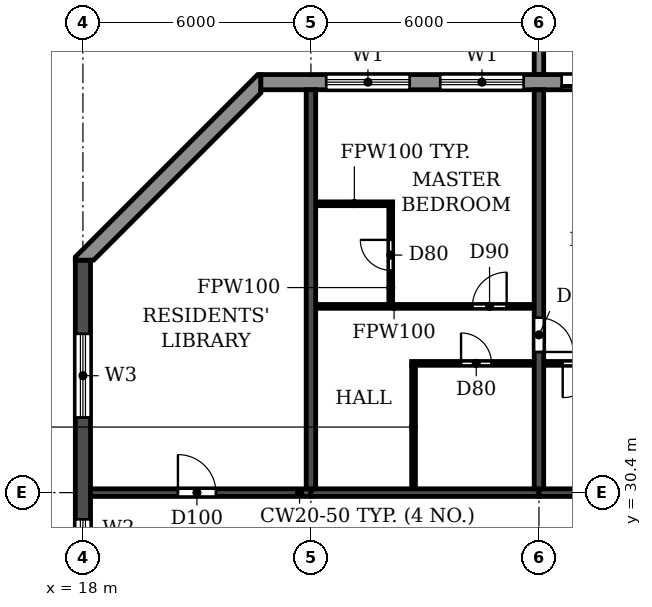
"""IFC4 building model, lengths in metres.
Left out: names, types, materials, properties, quantities, classifications, styles, units other than length and angle.
Written with IfcOpenShell. Run it as: python <this file> out.ifc"""

import sys

from ifc_helpers import new_model, si_unit, direction, frame, frame_2d, origin, place, context, subcontext, project, spatial, polyline, rectangle, outline, extrude, source, transform, mapped, element, fill, save


model = new_model("IFC4")
c1 = context("Model", 3, precision=1e-05, world=origin(), true_north=direction((0.0, 1.0)))
c2 = subcontext(c1, "Body", "Model", "MODEL_VIEW")
j1 = project(units=[si_unit("LENGTHUNIT", "METRE"), si_unit("PLANEANGLEUNIT", "RADIAN")], contexts=[c1])
p1 = place(None, origin())
s1 = spatial("IfcSite", under=j1, at=p1, CompositionType="ELEMENT")
p2 = place(p1, origin())
s2 = spatial("IfcBuilding", under=s1, at=p2, CompositionType="ELEMENT")
p3 = place(p2, frame((0.0, 0.0, 221.4)))
s3 = spatial("IfcBuildingStorey", under=s2, at=p3, CompositionType="ELEMENT", Elevation=221.4)
p4 = place(p3, frame((24.0, 30.5, 0.0), z_axis=(0.0, 0.0, 1.0), x_axis=(0.0, 1.0, 0.0)))
e1 = element("IfcWall", 1, at=p4, inside=s3, PredefinedType="SHEAR", context=c2, shape_type="SweptSolid", body=[
    extrude(rectangle(XDim=10.5, YDim=0.25, at=frame_2d((5.25, 0.0))), origin(), (0.0, 0.0, 1.0), 3.08),
])
p5 = place(p3, frame((30.0, 30.5, 0.0), z_axis=(0.0, 0.0, 1.0), x_axis=(0.0, 1.0, 0.0)))
e2 = element("IfcWall", 2, at=p5, inside=s3, PredefinedType="SHEAR", context=c2, shape_type="SweptSolid", body=[
    extrude(rectangle(XDim=10.5, YDim=0.25, at=frame_2d((5.25, 0.0))), origin(), (0.0, 0.0, 1.0), 3.08),
])
p6 = place(p5, frame((3.6, 0.0, 0.0)))
e3 = element("IfcOpeningElement", 3, at=p6, cuts=e2, PredefinedType="OPENING", context=c2, shape_type="SweptSolid", body=[
    extrude(rectangle(XDim=0.9, YDim=2.1, at=frame_2d((0.45, 1.05))), frame((0.0, 0.135, 0.0), z_axis=(0.0, -1.0, 0.0), x_axis=(1.0, 0.0, 0.0)), (0.0, 0.0, 1.0), 0.27),
])
p7 = place(p3, frame((18.0, 4.683, 0.0), z_axis=(0.0, 0.0, 1.0), x_axis=(0.0, 1.0, 0.0)))
e4 = element("IfcWall", 4, at=p7, inside=s3, PredefinedType="SHEAR", context=c2, shape_type="SweptSolid", body=[
    extrude(rectangle(XDim=31.834, YDim=0.4, at=frame_2d((15.917, 0.0))), origin(), (0.0, 0.0, 1.0), 3.08),
])
p8 = place(p7, frame((23.817, 0.0, 0.9)))
e5 = element("IfcOpeningElement", 5, at=p8, cuts=e4, PredefinedType="OPENING", context=c2, shape_type="SweptSolid", body=[
    extrude(rectangle(XDim=1.2, YDim=1.5, at=frame_2d((0.6, 0.75))), frame((0.0, 0.21, 0.0), z_axis=(0.0, -1.0, 0.0), x_axis=(1.0, 0.0, 0.0)), (0.0, 0.0, 1.0), 0.42),
])
p9 = place(p7, frame((8.017, 0.0, 0.9)))
e6 = element("IfcOpeningElement", 6, at=p9, cuts=e4, PredefinedType="OPENING", context=c2, shape_type="SweptSolid", body=[
    extrude(rectangle(XDim=1.2, YDim=1.5, at=frame_2d((0.6, 0.75))), frame((0.0, 0.21, 0.0), z_axis=(0.0, -1.0, 0.0), x_axis=(1.0, 0.0, 0.0)), (0.0, 0.0, 1.0), 0.42),
])
p10 = place(p7, frame((27.694, 0.0, 0.6)))
e7 = element("IfcOpeningElement", 7, at=p10, cuts=e4, PredefinedType="OPENING", context=c2, shape_type="SweptSolid", body=[
    extrude(rectangle(XDim=2.2, YDim=1.8, at=frame_2d((1.1, 0.9))), frame((0.0, 0.21, 0.0), z_axis=(0.0, -1.0, 0.0), x_axis=(1.0, 0.0, 0.0)), (0.0, 0.0, 1.0), 0.42),
])
p11 = place(p7, frame((2.541, 0.0, 0.6)))
e8 = element("IfcOpeningElement", 8, at=p11, cuts=e4, PredefinedType="OPENING", context=c2, shape_type="SweptSolid", body=[
    extrude(rectangle(XDim=2.2, YDim=1.8, at=frame_2d((1.1, 0.9))), frame((0.0, 0.21, 0.0), z_axis=(0.0, -1.0, 0.0), x_axis=(1.0, 0.0, 0.0)), (0.0, 0.0, 1.0), 0.42),
])
p12 = place(p7, frame((15.917, 0.0, 0.9)))
e9 = element("IfcOpeningElement", 9, at=p12, cuts=e4, PredefinedType="OPENING", context=c2, shape_type="SweptSolid", body=[
    extrude(rectangle(XDim=1.2, YDim=1.5, at=frame_2d((0.6, 0.75))), frame((0.0, 0.21, 0.0), z_axis=(0.0, -1.0, 0.0), x_axis=(1.0, 0.0, 0.0)), (0.0, 0.0, 1.0), 0.42),
])
p13 = place(p3, frame((18.2, 30.4, 0.0), z_axis=(0.0, 0.0, 1.0), x_axis=(1.0, 0.0, 0.0)))
e10 = element("IfcWall", 10, at=p13, inside=s3, PredefinedType="SHEAR", context=c2, shape_type="SweptSolid", body=[
    extrude(rectangle(XDim=5.8, YDim=0.2, at=frame_2d((2.9, 0.0))), origin(), (0.0, 0.0, 1.0), 2.48),
])
p14 = place(p13, frame((2.3, 0.0, 0.0)))
e11 = element("IfcOpeningElement", 11, at=p14, cuts=e10, PredefinedType="OPENING", context=c2, shape_type="SweptSolid", body=[
    extrude(rectangle(XDim=1.0, YDim=2.1, at=frame_2d((0.5, 1.05))), frame((0.0, 0.11, 0.0), z_axis=(0.0, -1.0, 0.0), x_axis=(1.0, 0.0, 0.0)), (0.0, 0.0, 1.0), 0.22),
])
p15 = place(p3, frame((24.0, 30.4, 0.0), z_axis=(0.0, 0.0, 1.0), x_axis=(1.0, 0.0, 0.0)))
e12 = element("IfcWall", 12, at=p15, inside=s3, PredefinedType="SHEAR", context=c2, shape_type="SweptSolid", body=[
    extrude(rectangle(XDim=6.0, YDim=0.2, at=frame_2d((3.0, 0.0))), origin(), (0.0, 0.0, 1.0), 2.48),
])
p16 = place(p3, frame((30.0, 30.4, 0.0), z_axis=(0.0, 0.0, 1.0), x_axis=(1.0, 0.0, 0.0)))
e13 = element("IfcWall", 13, at=p16, inside=s3, PredefinedType="SHEAR", context=c2, shape_type="SweptSolid", body=[
    extrude(rectangle(XDim=6.0, YDim=0.2, at=frame_2d((3.0, 0.0))), origin(), (0.0, 0.0, 1.0), 2.48),
])
p17 = place(p16, frame((2.55, 0.0, 0.0)))
e14 = element("IfcOpeningElement", 14, at=p17, cuts=e13, PredefinedType="OPENING", context=c2, shape_type="SweptSolid", body=[
    extrude(rectangle(XDim=1.0, YDim=2.1, at=frame_2d((0.5, 1.05))), frame((0.0, 0.11, 0.0), z_axis=(0.0, -1.0, 0.0), x_axis=(1.0, 0.0, 0.0)), (0.0, 0.0, 1.0), 0.22),
])
p18 = place(p3, frame((79.317, 41.2, 0.0), z_axis=(0.0, 0.0, 1.0), x_axis=(-1.0, 0.0, 0.0)))
e15 = element("IfcWall", 15, at=p18, inside=s3, PredefinedType="STANDARD", context=c2, shape_type="SweptSolid", body=[
    extrude(rectangle(XDim=56.634, YDim=0.4, at=frame_2d((28.317, 0.0))), origin(), (0.0, 0.0, 1.0), 3.08),
])
p19 = place(p18, frame((52.717, 0.0, 0.9)))
e16 = element("IfcOpeningElement", 16, at=p19, cuts=e15, PredefinedType="OPENING", context=c2, shape_type="SweptSolid", body=[
    extrude(rectangle(XDim=2.2, YDim=1.5, at=frame_2d((1.1, 0.75))), frame((0.0, 0.21, 0.0), z_axis=(0.0, -1.0, 0.0), x_axis=(1.0, 0.0, 0.0)), (0.0, 0.0, 1.0), 0.42),
])
p20 = place(p18, frame((49.717, 0.0, 0.9)))
e17 = element("IfcOpeningElement", 17, at=p20, cuts=e15, PredefinedType="OPENING", context=c2, shape_type="SweptSolid", body=[
    extrude(rectangle(XDim=2.2, YDim=1.5, at=frame_2d((1.1, 0.75))), frame((0.0, 0.21, 0.0), z_axis=(0.0, -1.0, 0.0), x_axis=(1.0, 0.0, 0.0)), (0.0, 0.0, 1.0), 0.42),
])
p21 = place(p18, frame((46.917, 0.0, 0.0)))
e18 = element("IfcOpeningElement", 18, at=p21, cuts=e15, PredefinedType="OPENING", context=c2, shape_type="SweptSolid", body=[
    extrude(rectangle(XDim=1.8, YDim=2.4, at=frame_2d((0.9, 1.2))), frame((0.0, 0.21, 0.0), z_axis=(0.0, -1.0, 0.0), x_axis=(1.0, 0.0, 0.0)), (0.0, 0.0, 1.0), 0.42),
])
p22 = place(p18, frame((43.717, 0.0, 0.9)))
e19 = element("IfcOpeningElement", 19, at=p22, cuts=e15, PredefinedType="OPENING", context=c2, shape_type="SweptSolid", body=[
    extrude(rectangle(XDim=2.2, YDim=1.5, at=frame_2d((1.1, 0.75))), frame((0.0, 0.21, 0.0), z_axis=(0.0, -1.0, 0.0), x_axis=(1.0, 0.0, 0.0)), (0.0, 0.0, 1.0), 0.42),
])
p23 = place(p18, frame((40.717, 0.0, 0.9)))
e20 = element("IfcOpeningElement", 20, at=p23, cuts=e15, PredefinedType="OPENING", context=c2, shape_type="SweptSolid", body=[
    extrude(rectangle(XDim=2.2, YDim=1.5, at=frame_2d((1.1, 0.75))), frame((0.0, 0.21, 0.0), z_axis=(0.0, -1.0, 0.0), x_axis=(1.0, 0.0, 0.0)), (0.0, 0.0, 1.0), 0.42),
])
p24 = place(p18, frame((37.917, 0.0, 0.0)))
e21 = element("IfcOpeningElement", 21, at=p24, cuts=e15, PredefinedType="OPENING", context=c2, shape_type="SweptSolid", body=[
    extrude(rectangle(XDim=1.8, YDim=2.4, at=frame_2d((0.9, 1.2))), frame((0.0, 0.21, 0.0), z_axis=(0.0, -1.0, 0.0), x_axis=(1.0, 0.0, 0.0)), (0.0, 0.0, 1.0), 0.42),
])
p25 = place(p18, frame((34.717, 0.0, 0.9)))
e22 = element("IfcOpeningElement", 22, at=p25, cuts=e15, PredefinedType="OPENING", context=c2, shape_type="SweptSolid", body=[
    extrude(rectangle(XDim=2.2, YDim=1.5, at=frame_2d((1.1, 0.75))), frame((0.0, 0.21, 0.0), z_axis=(0.0, -1.0, 0.0), x_axis=(1.0, 0.0, 0.0)), (0.0, 0.0, 1.0), 0.42),
])
p26 = place(p18, frame((31.717, 0.0, 0.9)))
e23 = element("IfcOpeningElement", 23, at=p26, cuts=e15, PredefinedType="OPENING", context=c2, shape_type="SweptSolid", body=[
    extrude(rectangle(XDim=2.2, YDim=1.5, at=frame_2d((1.1, 0.75))), frame((0.0, 0.21, 0.0), z_axis=(0.0, -1.0, 0.0), x_axis=(1.0, 0.0, 0.0)), (0.0, 0.0, 1.0), 0.42),
])
p27 = place(p18, frame((28.717, 0.0, 0.9)))
e24 = element("IfcOpeningElement", 24, at=p27, cuts=e15, PredefinedType="OPENING", context=c2, shape_type="SweptSolid", body=[
    extrude(rectangle(XDim=2.2, YDim=1.5, at=frame_2d((1.1, 0.75))), frame((0.0, 0.21, 0.0), z_axis=(0.0, -1.0, 0.0), x_axis=(1.0, 0.0, 0.0)), (0.0, 0.0, 1.0), 0.42),
])
p28 = place(p18, frame((25.917, 0.0, 0.0)))
e25 = element("IfcOpeningElement", 25, at=p28, cuts=e15, PredefinedType="OPENING", context=c2, shape_type="SweptSolid", body=[
    extrude(rectangle(XDim=1.8, YDim=2.4, at=frame_2d((0.9, 1.2))), frame((0.0, 0.21, 0.0), z_axis=(0.0, -1.0, 0.0), x_axis=(1.0, 0.0, 0.0)), (0.0, 0.0, 1.0), 0.42),
])
p29 = place(p18, frame((22.717, 0.0, 0.9)))
e26 = element("IfcOpeningElement", 26, at=p29, cuts=e15, PredefinedType="OPENING", context=c2, shape_type="SweptSolid", body=[
    extrude(rectangle(XDim=2.2, YDim=1.5, at=frame_2d((1.1, 0.75))), frame((0.0, 0.21, 0.0), z_axis=(0.0, -1.0, 0.0), x_axis=(1.0, 0.0, 0.0)), (0.0, 0.0, 1.0), 0.42),
])
p30 = place(p18, frame((19.717, 0.0, 0.9)))
e27 = element("IfcOpeningElement", 27, at=p30, cuts=e15, PredefinedType="OPENING", context=c2, shape_type="SweptSolid", body=[
    extrude(rectangle(XDim=2.2, YDim=1.5, at=frame_2d((1.1, 0.75))), frame((0.0, 0.21, 0.0), z_axis=(0.0, -1.0, 0.0), x_axis=(1.0, 0.0, 0.0)), (0.0, 0.0, 1.0), 0.42),
])
p31 = place(p18, frame((16.717, 0.0, 0.9)))
e28 = element("IfcOpeningElement", 28, at=p31, cuts=e15, PredefinedType="OPENING", context=c2, shape_type="SweptSolid", body=[
    extrude(rectangle(XDim=2.2, YDim=1.5, at=frame_2d((1.1, 0.75))), frame((0.0, 0.21, 0.0), z_axis=(0.0, -1.0, 0.0), x_axis=(1.0, 0.0, 0.0)), (0.0, 0.0, 1.0), 0.42),
])
p32 = place(p18, frame((13.917, 0.0, 0.0)))
e29 = element("IfcOpeningElement", 29, at=p32, cuts=e15, PredefinedType="OPENING", context=c2, shape_type="SweptSolid", body=[
    extrude(rectangle(XDim=1.8, YDim=2.4, at=frame_2d((0.9, 1.2))), frame((0.0, 0.21, 0.0), z_axis=(0.0, -1.0, 0.0), x_axis=(1.0, 0.0, 0.0)), (0.0, 0.0, 1.0), 0.42),
])
p33 = place(p18, frame((10.717, 0.0, 0.9)))
e30 = element("IfcOpeningElement", 30, at=p33, cuts=e15, PredefinedType="OPENING", context=c2, shape_type="SweptSolid", body=[
    extrude(rectangle(XDim=2.2, YDim=1.5, at=frame_2d((1.1, 0.75))), frame((0.0, 0.21, 0.0), z_axis=(0.0, -1.0, 0.0), x_axis=(1.0, 0.0, 0.0)), (0.0, 0.0, 1.0), 0.42),
])
p34 = place(p18, frame((7.917, 0.0, 0.0)))
e31 = element("IfcOpeningElement", 31, at=p34, cuts=e15, PredefinedType="OPENING", context=c2, shape_type="SweptSolid", body=[
    extrude(rectangle(XDim=1.8, YDim=2.4, at=frame_2d((0.9, 1.2))), frame((0.0, 0.21, 0.0), z_axis=(0.0, -1.0, 0.0), x_axis=(1.0, 0.0, 0.0)), (0.0, 0.0, 1.0), 0.42),
])
p35 = place(p18, frame((4.717, 0.0, 0.9)))
e32 = element("IfcOpeningElement", 32, at=p35, cuts=e15, PredefinedType="OPENING", context=c2, shape_type="SweptSolid", body=[
    extrude(rectangle(XDim=2.2, YDim=1.5, at=frame_2d((1.1, 0.75))), frame((0.0, 0.21, 0.0), z_axis=(0.0, -1.0, 0.0), x_axis=(1.0, 0.0, 0.0)), (0.0, 0.0, 1.0), 0.42),
])
p36 = place(p18, frame((1.917, 0.0, 0.0)))
e33 = element("IfcOpeningElement", 33, at=p36, cuts=e15, PredefinedType="OPENING", context=c2, shape_type="SweptSolid", body=[
    extrude(rectangle(XDim=1.8, YDim=2.4, at=frame_2d((0.9, 1.2))), frame((0.0, 0.21, 0.0), z_axis=(0.0, -1.0, 0.0), x_axis=(1.0, 0.0, 0.0)), (0.0, 0.0, 1.0), 0.42),
])
p37 = place(p3, origin())
e34 = element("IfcWall", 34, at=p37, inside=s3, PredefinedType="STANDARD", context=c2, shape_type="SweptSolid", body=[
    extrude(outline(polyline([(22.683, 41.4), (22.6, 41.4), (17.8, 36.6), (17.8, 36.517), (18.283, 36.517), (22.683, 40.917), (22.683, 41.4)])), origin(), (0.0, 0.0, 1.0), 3.08),
])
m1 = source(origin(), c2, "Body", "SweptSolid", [
    extrude(outline(polyline([(0.0, 0.0), (0.25, 0.0), (0.25, 3.1), (0.0, 3.1), (0.0, 0.0)])), origin(), (0.0, 0.0, 1.0), 3.1),
])
p38 = place(p3, frame((29.875, 41.4, 0.0)))
e35 = element("IfcWall", 35, at=p38, inside=s3, PredefinedType="STANDARD", context=c2, shape_type="MappedRepresentation", body=[
    mapped(m1, transform((0.0, 0.0, 0.0))),
])
p39 = place(p3, frame((26.65, 33.8, 0.0), z_axis=(0.0, 0.0, 1.0), x_axis=(1.0, 0.0, 0.0)))
e36 = element("IfcWall", 36, at=p39, inside=s3, PredefinedType="PARTITIONING", context=c2, shape_type="SweptSolid", body=[
    extrude(rectangle(XDim=3.215, YDim=0.1, at=frame_2d((1.607, 0.0))), origin(), (0.0, 0.0, 1.0), 3.08),
])
p40 = place(p39, frame((1.3, 0.0, 0.0)))
e37 = element("IfcOpeningElement", 37, at=p40, cuts=e36, PredefinedType="OPENING", context=c2, shape_type="SweptSolid", body=[
    extrude(rectangle(XDim=0.8, YDim=2.1, at=frame_2d((0.4, 1.05))), frame((0.0, 0.06, 0.0), z_axis=(0.0, -1.0, 0.0), x_axis=(1.0, 0.0, 0.0)), (0.0, 0.0, 1.0), 0.12),
])
p41 = place(p3, frame((30.135, 33.8, 0.0), z_axis=(0.0, 0.0, 1.0), x_axis=(1.0, 0.0, 0.0)))
e38 = element("IfcWall", 38, at=p41, inside=s3, PredefinedType="PARTITIONING", context=c2, shape_type="SweptSolid", body=[
    extrude(rectangle(XDim=2.065, YDim=0.1, at=frame_2d((1.032, 0.0))), origin(), (0.0, 0.0, 1.0), 3.08),
])
p42 = place(p41, frame((0.49, 0.0, 0.0)))
e39 = element("IfcOpeningElement", 39, at=p42, cuts=e38, PredefinedType="OPENING", context=c2, shape_type="SweptSolid", body=[
    extrude(rectangle(XDim=0.9, YDim=2.1, at=frame_2d((0.45, 1.05))), frame((0.0, 0.06, 0.0), z_axis=(0.0, -1.0, 0.0), x_axis=(1.0, 0.0, 0.0)), (0.0, 0.0, 1.0), 0.12),
])
p43 = place(p3, frame((24.135, 35.3, 0.0), z_axis=(0.0, 0.0, 1.0), x_axis=(1.0, 0.0, 0.0)))
e40 = element("IfcWall", 40, at=p43, inside=s3, PredefinedType="PARTITIONING", context=c2, shape_type="SweptSolid", body=[
    extrude(rectangle(XDim=5.73, YDim=0.1, at=frame_2d((2.865, 0.0))), origin(), (0.0, 0.0, 1.0), 3.08),
])
p44 = place(p43, frame((4.115, 0.0, 0.0)))
e41 = element("IfcOpeningElement", 41, at=p44, cuts=e40, PredefinedType="OPENING", context=c2, shape_type="SweptSolid", body=[
    extrude(rectangle(XDim=0.9, YDim=2.1, at=frame_2d((0.45, 1.05))), frame((0.0, 0.06, 0.0), z_axis=(0.0, -1.0, 0.0), x_axis=(1.0, 0.0, 0.0)), (0.0, 0.0, 1.0), 0.12),
])
p45 = place(p3, frame((24.135, 38.0, 0.0), z_axis=(0.0, 0.0, 1.0), x_axis=(1.0, 0.0, 0.0)))
e42 = element("IfcWall", 42, at=p45, inside=s3, PredefinedType="PARTITIONING", context=c2, shape_type="SweptSolid", body=[
    extrude(rectangle(XDim=2.015, YDim=0.1, at=frame_2d((1.007, 0.0))), origin(), (0.0, 0.0, 1.0), 3.08),
])
p46 = place(p3, frame((26.1, 35.35, 0.0), z_axis=(0.0, 0.0, 1.0), x_axis=(0.0, 1.0, 0.0)))
e43 = element("IfcWall", 43, at=p46, inside=s3, PredefinedType="PARTITIONING", context=c2, shape_type="SweptSolid", body=[
    extrude(rectangle(XDim=2.6, YDim=0.1, at=frame_2d((1.3, 0.0))), origin(), (0.0, 0.0, 1.0), 3.08),
])
p47 = place(p46, frame((0.9, 0.0, 0.0)))
e44 = element("IfcOpeningElement", 44, at=p47, cuts=e43, PredefinedType="OPENING", context=c2, shape_type="SweptSolid", body=[
    extrude(rectangle(XDim=0.8, YDim=2.1, at=frame_2d((0.4, 1.05))), frame((0.0, 0.06, 0.0), z_axis=(0.0, -1.0, 0.0), x_axis=(1.0, 0.0, 0.0)), (0.0, 0.0, 1.0), 0.12),
])
p48 = place(p3, frame((26.7, 30.51, 0.0), z_axis=(0.0, 0.0, 1.0), x_axis=(0.0, 1.0, 0.0)))
e45 = element("IfcWall", 45, at=p48, inside=s3, PredefinedType="PARTITIONING", context=c2, shape_type="SweptSolid", body=[
    extrude(rectangle(XDim=3.24, YDim=0.1, at=frame_2d((1.62, 0.0))), origin(), (0.0, 0.0, 1.0), 3.08),
])
p49 = place(p19, origin())
e46 = element("IfcWindow", 46, at=p49, inside=s3, PartitioningType="DOUBLE_PANEL_HORIZONTAL", PredefinedType="WINDOW", context=c2, shape_type="SweptSolid", body=[
    extrude(rectangle(XDim=2.2, YDim=1.5, at=frame_2d((1.1, 0.75))), frame((0.0, 0.03, 0.0), z_axis=(0.0, -1.0, 0.0), x_axis=(1.0, 0.0, 0.0)), (0.0, 0.0, 1.0), 0.06),
])
fill(e16, e46)
p50 = place(p20, origin())
e47 = element("IfcWindow", 47, at=p50, inside=s3, PartitioningType="DOUBLE_PANEL_HORIZONTAL", PredefinedType="WINDOW", context=c2, shape_type="SweptSolid", body=[
    extrude(rectangle(XDim=2.2, YDim=1.5, at=frame_2d((1.1, 0.75))), frame((0.0, 0.03, 0.0), z_axis=(0.0, -1.0, 0.0), x_axis=(1.0, 0.0, 0.0)), (0.0, 0.0, 1.0), 0.06),
])
fill(e17, e47)
p51 = place(p21, origin())
e48 = element("IfcDoor", 48, at=p51, inside=s3, OperationType="DOUBLE_DOOR_SLIDING", PredefinedType="DOOR", context=c2, shape_type="SweptSolid", body=[
    extrude(rectangle(XDim=1.8, YDim=2.4, at=frame_2d((0.9, 1.2))), frame((0.0, 0.025, 0.0), z_axis=(0.0, -1.0, 0.0), x_axis=(1.0, 0.0, 0.0)), (0.0, 0.0, 1.0), 0.05),
])
fill(e18, e48)
p52 = place(p8, origin())
e49 = element("IfcWindow", 49, at=p52, inside=s3, PartitioningType="SINGLE_PANEL", PredefinedType="WINDOW", context=c2, shape_type="SweptSolid", body=[
    extrude(rectangle(XDim=1.2, YDim=1.5, at=frame_2d((0.6, 0.75))), frame((0.0, 0.03, 0.0), z_axis=(0.0, -1.0, 0.0), x_axis=(1.0, 0.0, 0.0)), (0.0, 0.0, 1.0), 0.06),
])
fill(e5, e49)
p53 = place(p10, origin())
e50 = element("IfcWindow", 50, at=p53, inside=s3, PartitioningType="DOUBLE_PANEL_HORIZONTAL", PredefinedType="WINDOW", context=c2, shape_type="SweptSolid", body=[
    extrude(rectangle(XDim=2.2, YDim=1.8, at=frame_2d((1.1, 0.9))), frame((0.0, 0.03, 0.0), z_axis=(0.0, -1.0, 0.0), x_axis=(1.0, 0.0, 0.0)), (0.0, 0.0, 1.0), 0.06),
])
fill(e7, e50)
p54 = place(p14, origin())
e51 = element("IfcDoor", 51, at=p54, inside=s3, OperationType="SINGLE_SWING_LEFT", PredefinedType="DOOR", context=c2, shape_type="SweptSolid", body=[
    extrude(rectangle(XDim=1.0, YDim=2.1, at=frame_2d((0.5, 1.05))), frame((0.0, 0.025, 0.0), z_axis=(0.0, -1.0, 0.0), x_axis=(1.0, 0.0, 0.0)), (0.0, 0.0, 1.0), 0.05),
])
fill(e11, e51)
p55 = place(p40, origin())
e52 = element("IfcDoor", 52, at=p55, inside=s3, OperationType="SINGLE_SWING_LEFT", PredefinedType="DOOR", context=c2, shape_type="SweptSolid", body=[
    extrude(rectangle(XDim=0.8, YDim=2.1, at=frame_2d((0.4, 1.05))), frame((0.0, 0.025, 0.0), z_axis=(0.0, -1.0, 0.0), x_axis=(1.0, 0.0, 0.0)), (0.0, 0.0, 1.0), 0.05),
])
fill(e37, e52)
p56 = place(p44, origin())
e53 = element("IfcDoor", 53, at=p56, inside=s3, OperationType="SINGLE_SWING_RIGHT", PredefinedType="DOOR", context=c2, shape_type="SweptSolid", body=[
    extrude(rectangle(XDim=0.9, YDim=2.1, at=frame_2d((0.45, 1.05))), frame((0.0, 0.025, 0.0), z_axis=(0.0, -1.0, 0.0), x_axis=(1.0, 0.0, 0.0)), (0.0, 0.0, 1.0), 0.05),
])
fill(e41, e53)
p57 = place(p6, frame((0.9, 0.0, 0.0), z_axis=(0.0, 0.0, 1.0), x_axis=(-1.0, 0.0, 0.0)))
e54 = element("IfcDoor", 54, at=p57, inside=s3, OperationType="SINGLE_SWING_RIGHT", PredefinedType="DOOR", context=c2, shape_type="SweptSolid", body=[
    extrude(rectangle(XDim=0.9, YDim=2.1, at=frame_2d((0.45, 1.05))), frame((0.0, 0.025, 0.0), z_axis=(0.0, -1.0, 0.0), x_axis=(1.0, 0.0, 0.0)), (0.0, 0.0, 1.0), 0.05),
])
fill(e3, e54)
p58 = place(p42, frame((0.9, 0.0, 0.0), z_axis=(0.0, 0.0, 1.0), x_axis=(-1.0, 0.0, 0.0)))
e55 = element("IfcDoor", 55, at=p58, inside=s3, OperationType="SINGLE_SWING_RIGHT", PredefinedType="DOOR", context=c2, shape_type="SweptSolid", body=[
    extrude(rectangle(XDim=0.9, YDim=2.1, at=frame_2d((0.45, 1.05))), frame((0.0, 0.025, 0.0), z_axis=(0.0, -1.0, 0.0), x_axis=(1.0, 0.0, 0.0)), (0.0, 0.0, 1.0), 0.05),
])
fill(e39, e55)
p59 = place(p47, origin())
e56 = element("IfcDoor", 56, at=p59, inside=s3, OperationType="SINGLE_SWING_RIGHT", PredefinedType="DOOR", context=c2, shape_type="SweptSolid", body=[
    extrude(rectangle(XDim=0.8, YDim=2.1, at=frame_2d((0.4, 1.05))), frame((0.0, 0.025, 0.0), z_axis=(0.0, -1.0, 0.0), x_axis=(1.0, 0.0, 0.0)), (0.0, 0.0, 1.0), 0.05),
])
fill(e44, e56)
save(model, sys.argv[1])
